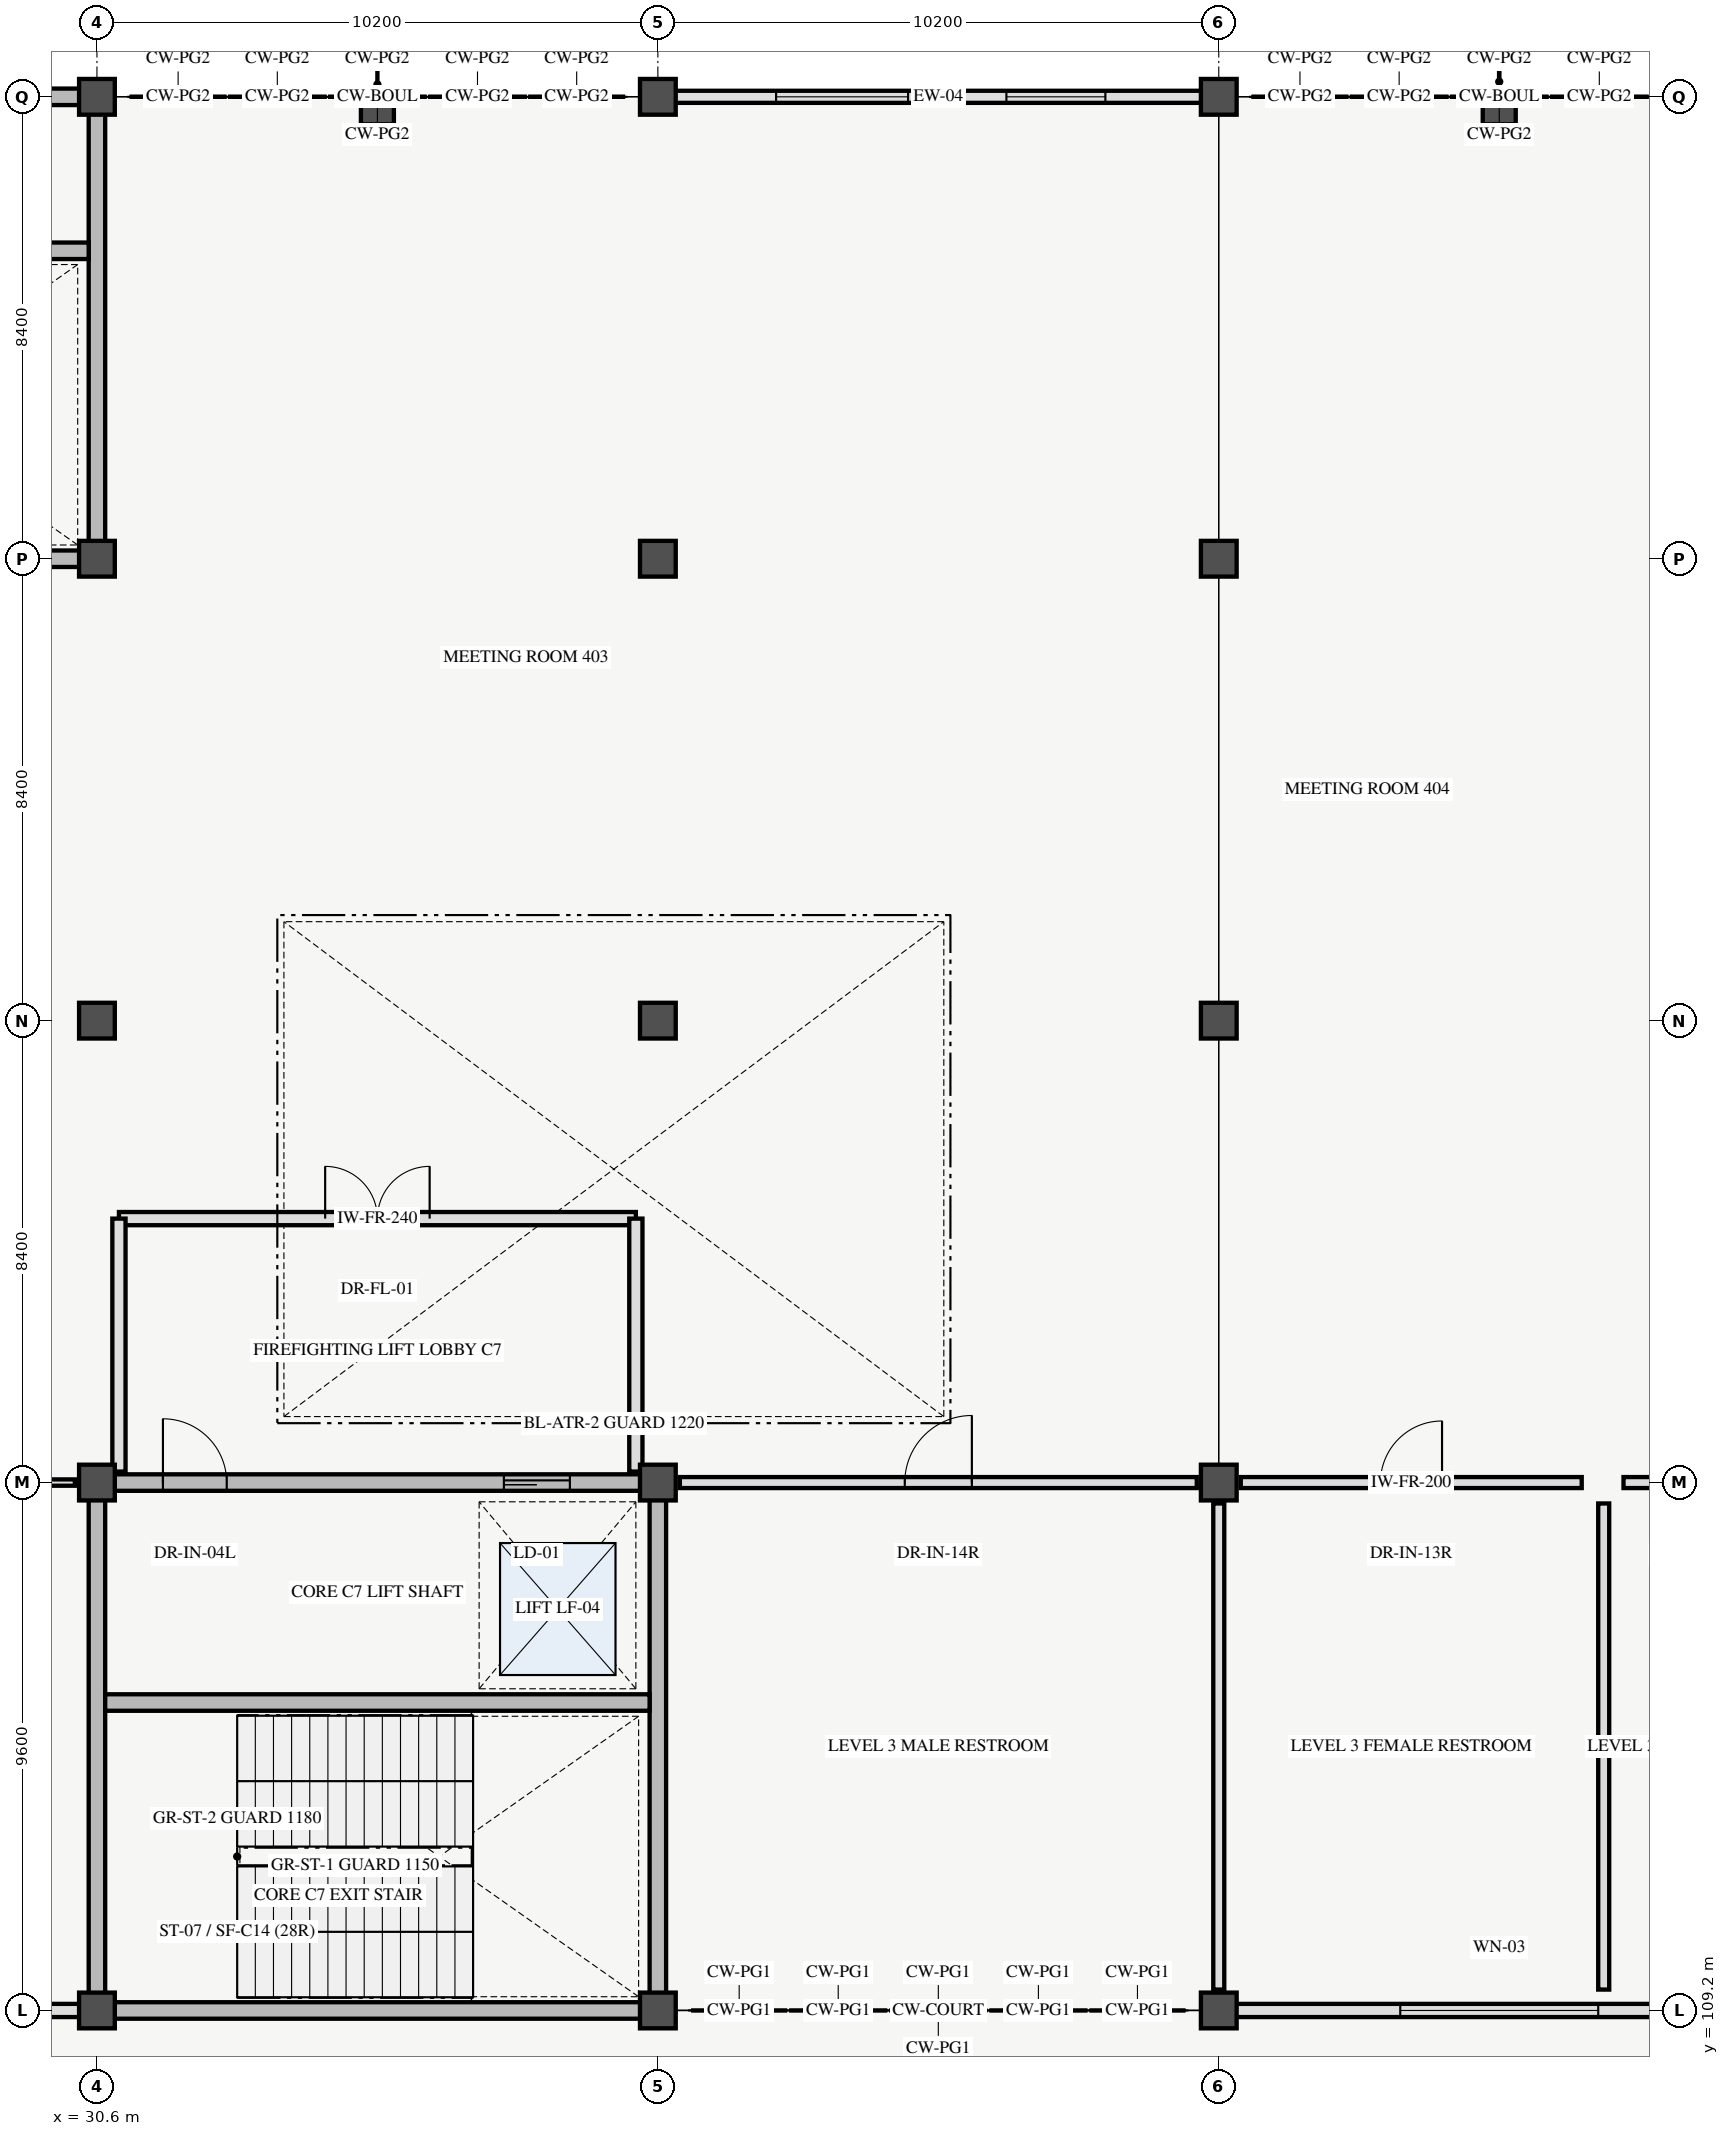
"""IFC4 building model, lengths in metres.
Left out: names, types, materials, properties, quantities, classifications, styles, units other than length and angle.
Written with IfcOpenShell. Run it as: python <this file> out.ifc"""

import sys

from ifc_helpers import new_model, si_unit, direction, frame, frame_2d, origin, origin_2d, place, context, subcontext, project, spatial, rectangle, extrude, element, fill, save


model = new_model("IFC4")
c1 = context("Model", 3, precision=1e-05, world=origin(), true_north=direction((0.0, 1.0)))
c2 = subcontext(c1, "Body", "Model", "MODEL_VIEW")
j1 = project(units=[si_unit("LENGTHUNIT", "METRE"), si_unit("PLANEANGLEUNIT", "RADIAN")], contexts=[c1])
p1 = place(None, origin())
s1 = spatial("IfcSite", under=j1, at=p1, CompositionType="ELEMENT")
p2 = place(p1, origin())
s2 = spatial("IfcBuilding", under=s1, at=p2, CompositionType="ELEMENT")
p3 = place(p2, frame((0.0, 0.0, 15.0)))
s3 = spatial("IfcBuildingStorey", under=s2, at=p3, CompositionType="ELEMENT", Elevation=15.0)
for number, where, z_axis, x_axis in (
    (1, (30.6, 109.2, 0.0), (0.0, 0.0, 1.0), (1.0, 0.0, 0.0)),
    (2, (30.6, 118.8, 0.0), (0.0, 0.0, 1.0), (1.0, 0.0, 0.0)),
    (3, (30.6, 127.2, 0.0), (0.0, 0.0, 1.0), (1.0, 0.0, 0.0)),
    (4, (30.6, 135.6, 0.0), (0.0, 0.0, 1.0), (1.0, 0.0, 0.0)),
    (5, (30.6, 144.0, 0.0), (0.0, 0.0, 1.0), (1.0, 0.0, 0.0)),
    (6, (40.8, 109.2, 0.0), (0.0, 0.0, 1.0), (1.0, 0.0, 0.0)),
    (7, (40.8, 118.8, 0.0), (0.0, 0.0, 1.0), (1.0, 0.0, 0.0)),
    (8, (40.8, 127.2, 0.0), (0.0, 0.0, 1.0), (1.0, 0.0, 0.0)),
    (9, (40.8, 135.6, 0.0), (0.0, 0.0, 1.0), (1.0, 0.0, 0.0)),
    (10, (40.8, 144.0, 0.0), (0.0, 0.0, 1.0), (1.0, 0.0, 0.0)),
    (11, (51.0, 109.2, 0.0), (0.0, 0.0, 1.0), (1.0, 0.0, 0.0)),
    (12, (51.0, 118.8, 0.0), (0.0, 0.0, 1.0), (1.0, 0.0, 0.0)),
    (13, (51.0, 127.2, 0.0), (0.0, 0.0, 1.0), (1.0, 0.0, 0.0)),
    (14, (51.0, 135.6, 0.0), (0.0, 0.0, 1.0), (1.0, 0.0, 0.0)),
    (15, (51.0, 144.0, 0.0), (0.0, 0.0, 1.0), (1.0, 0.0, 0.0)),
):
    element("IfcColumn", number, at=place(p3, frame(where, z_axis=z_axis, x_axis=x_axis)), inside=s3, PredefinedType="COLUMN", context=c2, shape_type="SweptSolid", body=[
        extrude(rectangle(XDim=0.65, YDim=0.65, at=origin_2d()), origin(), (0.0, 0.0, 1.0), 4.2),
    ])
for number, where, z_axis, x_axis in (
    (16, (35.7, 143.7, 0.0), (0.0, 0.0, 1.0), (1.0, 0.0, 0.0)),
    (17, (56.1, 143.7, 0.0), (0.0, 0.0, 1.0), (1.0, 0.0, 0.0)),
):
    element("IfcColumn", number, at=place(p3, frame(where, z_axis=z_axis, x_axis=x_axis)), inside=s3, PredefinedType="PILASTER", context=c2, shape_type="SweptSolid", body=[
        extrude(rectangle(XDim=0.6, YDim=0.4, at=origin_2d()), origin(), (0.0, 0.0, 1.0), 4.2),
    ])
p4 = place(p3, frame((30.6, 109.2, 0.0), z_axis=(0.0, 0.0, 1.0), x_axis=(1.0, 0.0, 0.0)))
e18 = element("IfcWall", 18, at=p4, inside=s3, PredefinedType="SHEAR", context=c2, shape_type="SweptSolid", body=[
    extrude(rectangle(XDim=10.2, YDim=0.3, at=frame_2d((5.1, 0.0))), origin(), (0.0, 0.0, 1.0), 4.2),
])
p5 = place(p3, frame((30.6, 118.8, 0.0), z_axis=(0.0, 0.0, 1.0), x_axis=(1.0, 0.0, 0.0)))
e19 = element("IfcWall", 19, at=p5, inside=s3, PredefinedType="SHEAR", context=c2, shape_type="SweptSolid", body=[
    extrude(rectangle(XDim=10.2, YDim=0.3, at=frame_2d((5.1, 0.0))), origin(), (0.0, 0.0, 1.0), 4.2),
])
p6 = place(p5, frame((1.2, 0.0, 0.0)))
e20 = element("IfcOpeningElement", 20, at=p6, cuts=e19, PredefinedType="OPENING", context=c2, shape_type="SweptSolid", body=[
    extrude(rectangle(XDim=1.16, YDim=2.2, at=frame_2d((0.58, 1.1))), frame((0.0, 0.16, 0.0), z_axis=(0.0, -1.0, 0.0), x_axis=(1.0, 0.0, 0.0)), (0.0, 0.0, 1.0), 0.32),
])
p7 = place(p5, frame((7.4, 0.0, 0.0)))
e21 = element("IfcOpeningElement", 21, at=p7, cuts=e19, PredefinedType="OPENING", context=c2, shape_type="SweptSolid", body=[
    extrude(rectangle(XDim=1.2, YDim=2.25, at=frame_2d((0.6, 1.125))), frame((0.0, 0.16, 0.0), z_axis=(0.0, -1.0, 0.0), x_axis=(1.0, 0.0, 0.0)), (0.0, 0.0, 1.0), 0.32),
])
for number, where, z_axis, x_axis in (
    (22, (30.6, 109.2, 0.0), (0.0, 0.0, 1.0), (0.0, 1.0, 0.0)),
    (23, (40.8, 109.2, 0.0), (0.0, 0.0, 1.0), (0.0, 1.0, 0.0)),
):
    element("IfcWall", number, at=place(p3, frame(where, z_axis=z_axis, x_axis=x_axis)), inside=s3, PredefinedType="SHEAR", context=c2, shape_type="SweptSolid", body=[
        extrude(rectangle(XDim=9.6, YDim=0.3, at=frame_2d((4.8, 0.0))), origin(), (0.0, 0.0, 1.0), 4.2),
    ])
p8 = place(p3, frame((20.64, 109.2, 0.0), z_axis=(0.0, 0.0, 1.0), x_axis=(1.0, 0.0, 0.0)))
e24 = element("IfcWall", 24, at=p8, inside=s3, PredefinedType="STANDARD", context=c2, shape_type="SweptSolid", body=[
    extrude(rectangle(XDim=9.72, YDim=0.24, at=frame_2d((4.86, 0.0))), origin(), (0.0, 0.0, 1.0), 3.06),
])
p9 = place(p8, frame((3.81, 0.0, 0.0)))
e25 = element("IfcOpeningElement", 25, at=p9, cuts=e24, PredefinedType="OPENING", context=c2, shape_type="SweptSolid", body=[
    extrude(rectangle(XDim=2.1, YDim=2.3, at=frame_2d((1.05, 1.15))), frame((0.0, 0.13, 0.0), z_axis=(0.0, -1.0, 0.0), x_axis=(1.0, 0.0, 0.0)), (0.0, 0.0, 1.0), 0.26),
])
p10 = place(p3, frame((41.04, 144.0, 0.0), z_axis=(0.0, 0.0, 1.0), x_axis=(1.0, 0.0, 0.0)))
e26 = element("IfcWall", 26, at=p10, inside=s3, PredefinedType="STANDARD", context=c2, shape_type="SweptSolid", body=[
    extrude(rectangle(XDim=9.72, YDim=0.22, at=frame_2d((4.86, 0.0))), origin(), (0.0, 0.0, 1.0), 3.06),
])
p11 = place(p10, frame((1.91, 0.0, 0.7)))
e27 = element("IfcOpeningElement", 27, at=p11, cuts=e26, PredefinedType="OPENING", context=c2, shape_type="SweptSolid", body=[
    extrude(rectangle(XDim=2.4, YDim=2.1, at=frame_2d((1.2, 1.05))), frame((0.0, 0.12, 0.0), z_axis=(0.0, -1.0, 0.0), x_axis=(1.0, 0.0, 0.0)), (0.0, 0.0, 1.0), 0.24),
])
p12 = place(p10, frame((6.098, 0.0, 0.85)))
e28 = element("IfcOpeningElement", 28, at=p12, cuts=e26, PredefinedType="OPENING", context=c2, shape_type="SweptSolid", body=[
    extrude(rectangle(XDim=1.8, YDim=1.8, at=frame_2d((0.9, 0.9))), frame((0.0, 0.12, 0.0), z_axis=(0.0, -1.0, 0.0), x_axis=(1.0, 0.0, 0.0)), (0.0, 0.0, 1.0), 0.24),
])
p13 = place(p3, frame((51.24, 109.2, 0.0), z_axis=(0.0, 0.0, 1.0), x_axis=(1.0, 0.0, 0.0)))
e29 = element("IfcWall", 29, at=p13, inside=s3, PredefinedType="STANDARD", context=c2, shape_type="SweptSolid", body=[
    extrude(rectangle(XDim=9.72, YDim=0.24, at=frame_2d((4.86, 0.0))), origin(), (0.0, 0.0, 1.0), 3.06),
])
p14 = place(p13, frame((3.06, 0.0, 0.9)))
e30 = element("IfcOpeningElement", 30, at=p14, cuts=e29, PredefinedType="OPENING", context=c2, shape_type="SweptSolid", body=[
    extrude(rectangle(XDim=3.6, YDim=2.1, at=frame_2d((1.8, 1.05))), frame((0.0, 0.13, 0.0), z_axis=(0.0, -1.0, 0.0), x_axis=(1.0, 0.0, 0.0)), (0.0, 0.0, 1.0), 0.26),
])
p15 = place(p3, frame((30.75, 114.8, 0.0), z_axis=(0.0, 0.0, 1.0), x_axis=(1.0, 0.0, 0.0)))
e31 = element("IfcWall", 31, at=p15, inside=s3, PredefinedType="SHEAR", context=c2, shape_type="SweptSolid", body=[
    extrude(rectangle(XDim=9.9, YDim=0.3, at=frame_2d((4.95, 0.0))), origin(), (0.0, 0.0, 1.0), 4.2),
])
p16 = place(p3, frame((20.4, 135.6, 0.0), z_axis=(0.0, 0.0, 1.0), x_axis=(1.0, 0.0, 0.0)))
e32 = element("IfcWall", 32, at=p16, inside=s3, PredefinedType="SHEAR", context=c2, shape_type="SweptSolid", body=[
    extrude(rectangle(XDim=10.2, YDim=0.3, at=frame_2d((5.1, 0.0))), origin(), (0.0, 0.0, 1.0), 4.2),
])
p17 = place(p16, frame((0.92, 0.0, 0.0)))
e33 = element("IfcOpeningElement", 33, at=p17, cuts=e32, PredefinedType="OPENING", context=c2, shape_type="SweptSolid", body=[
    extrude(rectangle(XDim=1.16, YDim=2.2, at=frame_2d((0.58, 1.1))), frame((0.0, 0.16, 0.0), z_axis=(0.0, -1.0, 0.0), x_axis=(1.0, 0.0, 0.0)), (0.0, 0.0, 1.0), 0.32),
])
p18 = place(p3, frame((20.4, 144.0, 0.0), z_axis=(0.0, 0.0, 1.0), x_axis=(1.0, 0.0, 0.0)))
e34 = element("IfcWall", 34, at=p18, inside=s3, PredefinedType="SHEAR", context=c2, shape_type="SweptSolid", body=[
    extrude(rectangle(XDim=10.2, YDim=0.3, at=frame_2d((5.1, 0.0))), origin(), (0.0, 0.0, 1.0), 4.2),
])
p19 = place(p3, frame((30.6, 135.6, 0.0), z_axis=(0.0, 0.0, 1.0), x_axis=(0.0, 1.0, 0.0)))
e35 = element("IfcWall", 35, at=p19, inside=s3, PredefinedType="SHEAR", context=c2, shape_type="SweptSolid", body=[
    extrude(rectangle(XDim=8.4, YDim=0.3, at=frame_2d((4.2, 0.0))), origin(), (0.0, 0.0, 1.0), 4.2),
])
p20 = place(p3, frame((20.55, 141.2, 0.0), z_axis=(0.0, 0.0, 1.0), x_axis=(1.0, 0.0, 0.0)))
e36 = element("IfcWall", 36, at=p20, inside=s3, PredefinedType="SHEAR", context=c2, shape_type="SweptSolid", body=[
    extrude(rectangle(XDim=9.9, YDim=0.3, at=frame_2d((4.95, 0.0))), origin(), (0.0, 0.0, 1.0), 4.2),
])
p21 = place(p3, frame((31.0, 123.6, 0.0), z_axis=(0.0, 0.0, 1.0), x_axis=(1.0, 0.0, 0.0)))
e37 = element("IfcWall", 37, at=p21, inside=s3, PredefinedType="PARTITIONING", context=c2, shape_type="SweptSolid", body=[
    extrude(rectangle(XDim=9.4, YDim=0.24, at=frame_2d((4.7, 0.0))), origin(), (0.0, 0.0, 1.0), 3.06),
])
p22 = place(p21, frame((3.75, 0.0, 0.0)))
e38 = element("IfcOpeningElement", 38, at=p22, cuts=e37, PredefinedType="OPENING", context=c2, shape_type="SweptSolid", body=[
    extrude(rectangle(XDim=1.9, YDim=2.25, at=frame_2d((0.95, 1.125))), frame((0.0, 0.13, 0.0), z_axis=(0.0, -1.0, 0.0), x_axis=(1.0, 0.0, 0.0)), (0.0, 0.0, 1.0), 0.26),
])
for number, where, z_axis, x_axis in (
    (39, (40.4, 119.0, 0.0), (0.0, 0.0, 1.0), (0.0, 1.0, 0.0)),
    (40, (31.0, 119.0, 0.0), (0.0, 0.0, 1.0), (0.0, 1.0, 0.0)),
):
    element("IfcWall", number, at=place(p3, frame(where, z_axis=z_axis, x_axis=x_axis)), inside=s3, PredefinedType="PARTITIONING", context=c2, shape_type="SweptSolid", body=[
        extrude(rectangle(XDim=4.6, YDim=0.24, at=frame_2d((2.3, 0.0))), origin(), (0.0, 0.0, 1.0), 3.06),
    ])
p23 = place(p3, frame((20.8, 118.8, 0.0), z_axis=(0.0, 0.0, 1.0), x_axis=(1.0, 0.0, 0.0)))
e41 = element("IfcWall", 41, at=p23, inside=s3, PredefinedType="PARTITIONING", context=c2, shape_type="SweptSolid", body=[
    extrude(rectangle(XDim=9.4, YDim=0.115, at=frame_2d((4.7, 0.0))), origin(), (0.0, 0.0, 1.0), 3.06),
])
p24 = place(p23, frame((4.16, 0.0, 0.0)))
e42 = element("IfcOpeningElement", 42, at=p24, cuts=e41, PredefinedType="OPENING", context=c2, shape_type="SweptSolid", body=[
    extrude(rectangle(XDim=1.08, YDim=2.18, at=frame_2d((0.54, 1.09))), frame((0.0, 0.067, 0.0), z_axis=(0.0, -1.0, 0.0), x_axis=(1.0, 0.0, 0.0)), (0.0, 0.0, 1.0), 0.135),
])
p25 = place(p3, frame((51.4, 118.8, 0.0), z_axis=(0.0, 0.0, 1.0), x_axis=(1.0, 0.0, 0.0)))
e43 = element("IfcWall", 43, at=p25, inside=s3, PredefinedType="PARTITIONING", context=c2, shape_type="SweptSolid", body=[
    extrude(rectangle(XDim=6.2, YDim=0.2, at=frame_2d((3.1, 0.0))), origin(), (0.0, 0.0, 1.0), 3.06),
])
p26 = place(p25, frame((2.54, 0.0, 0.0)))
e44 = element("IfcOpeningElement", 44, at=p26, cuts=e43, PredefinedType="OPENING", context=c2, shape_type="SweptSolid", body=[
    extrude(rectangle(XDim=1.12, YDim=2.18, at=frame_2d((0.56, 1.09))), frame((0.0, 0.11, 0.0), z_axis=(0.0, -1.0, 0.0), x_axis=(1.0, 0.0, 0.0)), (0.0, 0.0, 1.0), 0.22),
])
p27 = place(p3, frame((41.2, 118.8, 0.0), z_axis=(0.0, 0.0, 1.0), x_axis=(1.0, 0.0, 0.0)))
e45 = element("IfcWall", 45, at=p27, inside=s3, PredefinedType="PARTITIONING", context=c2, shape_type="SweptSolid", body=[
    extrude(rectangle(XDim=9.4, YDim=0.2, at=frame_2d((4.7, 0.0))), origin(), (0.0, 0.0, 1.0), 3.06),
])
p28 = place(p27, frame((4.09, 0.0, 0.0)))
e46 = element("IfcOpeningElement", 46, at=p28, cuts=e45, PredefinedType="OPENING", context=c2, shape_type="SweptSolid", body=[
    extrude(rectangle(XDim=1.22, YDim=2.22, at=frame_2d((0.61, 1.11))), frame((0.0, 0.11, 0.0), z_axis=(0.0, -1.0, 0.0), x_axis=(1.0, 0.0, 0.0)), (0.0, 0.0, 1.0), 0.22),
])
p29 = place(p3, frame((58.36, 118.8, 0.0), z_axis=(0.0, 0.0, 1.0), x_axis=(1.0, 0.0, 0.0)))
e47 = element("IfcWall", 47, at=p29, inside=s3, PredefinedType="PARTITIONING", context=c2, shape_type="SweptSolid", body=[
    extrude(rectangle(XDim=2.48, YDim=0.2, at=frame_2d((1.24, 0.0))), origin(), (0.0, 0.0, 1.0), 3.06),
])
p30 = place(p29, frame((0.8, 0.0, 0.0)))
e48 = element("IfcOpeningElement", 48, at=p30, cuts=e47, PredefinedType="OPENING", context=c2, shape_type="SweptSolid", body=[
    extrude(rectangle(XDim=0.88, YDim=2.08, at=frame_2d((0.44, 1.04))), frame((0.0, 0.11, 0.0), z_axis=(0.0, -1.0, 0.0), x_axis=(1.0, 0.0, 0.0)), (0.0, 0.0, 1.0), 0.22),
])
for number, where, z_axis, x_axis in (
    (49, (51.0, 109.58, 0.0), (0.0, 0.0, 1.0), (0.0, 1.0, 0.0)),
    (50, (58.0, 109.58, 0.0), (0.0, 0.0, 1.0), (0.0, 1.0, 0.0)),
):
    element("IfcWall", number, at=place(p3, frame(where, z_axis=z_axis, x_axis=x_axis)), inside=s3, PredefinedType="PARTITIONING", context=c2, shape_type="SweptSolid", body=[
        extrude(rectangle(XDim=8.84, YDim=0.2, at=frame_2d((4.42, 0.0))), origin(), (0.0, 0.0, 1.0), 3.06),
    ])
p31 = place(p11, origin())
e51 = element("IfcWindow", 51, at=p31, inside=s3, PartitioningType="DOUBLE_PANEL_VERTICAL", PredefinedType="WINDOW", context=c2, shape_type="SweptSolid", body=[
    extrude(rectangle(XDim=2.4, YDim=2.1, at=frame_2d((1.2, 1.05))), frame((0.0, 0.03, 0.0), z_axis=(0.0, -1.0, 0.0), x_axis=(1.0, 0.0, 0.0)), (0.0, 0.0, 1.0), 0.06),
])
fill(e27, e51)
p32 = place(p12, origin())
e52 = element("IfcWindow", 52, at=p32, inside=s3, PartitioningType="DOUBLE_PANEL_VERTICAL", PredefinedType="WINDOW", context=c2, shape_type="SweptSolid", body=[
    extrude(rectangle(XDim=1.8, YDim=1.8, at=frame_2d((0.9, 0.9))), frame((0.0, 0.03, 0.0), z_axis=(0.0, -1.0, 0.0), x_axis=(1.0, 0.0, 0.0)), (0.0, 0.0, 1.0), 0.06),
])
fill(e28, e52)
p33 = place(p14, origin())
e53 = element("IfcWindow", 53, at=p33, inside=s3, PartitioningType="TRIPLE_PANEL_VERTICAL", PredefinedType="WINDOW", context=c2, shape_type="SweptSolid", body=[
    extrude(rectangle(XDim=3.6, YDim=2.1, at=frame_2d((1.8, 1.05))), frame((0.0, 0.03, 0.0), z_axis=(0.0, -1.0, 0.0), x_axis=(1.0, 0.0, 0.0)), (0.0, 0.0, 1.0), 0.06),
])
fill(e30, e53)
p34 = place(p6, origin())
e54 = element("IfcDoor", 54, at=p34, inside=s3, OperationType="SINGLE_SWING_LEFT", PredefinedType="DOOR", context=c2, shape_type="SweptSolid", body=[
    extrude(rectangle(XDim=1.16, YDim=2.2, at=frame_2d((0.58, 1.1))), frame((0.0, 0.025, 0.0), z_axis=(0.0, -1.0, 0.0), x_axis=(1.0, 0.0, 0.0)), (0.0, 0.0, 1.0), 0.05),
])
fill(e20, e54)
p35 = place(p7, origin())
e55 = element("IfcDoor", 55, at=p35, inside=s3, OperationType="SLIDING_TO_LEFT", PredefinedType="DOOR", context=c2, shape_type="SweptSolid", body=[
    extrude(rectangle(XDim=1.2, YDim=2.25, at=frame_2d((0.6, 1.125))), frame((0.0, 0.025, 0.0), z_axis=(0.0, -1.0, 0.0), x_axis=(1.0, 0.0, 0.0)), (0.0, 0.0, 1.0), 0.05),
])
fill(e21, e55)
p36 = place(p22, origin())
e56 = element("IfcDoor", 56, at=p36, inside=s3, OperationType="DOUBLE_DOOR_SINGLE_SWING", PredefinedType="DOOR", context=c2, shape_type="SweptSolid", body=[
    extrude(rectangle(XDim=1.9, YDim=2.25, at=frame_2d((0.95, 1.125))), frame((0.0, 0.025, 0.0), z_axis=(0.0, -1.0, 0.0), x_axis=(1.0, 0.0, 0.0)), (0.0, 0.0, 1.0), 0.05),
])
fill(e38, e56)
p37 = place(p26, origin())
e57 = element("IfcDoor", 57, at=p37, inside=s3, OperationType="SINGLE_SWING_RIGHT", PredefinedType="DOOR", context=c2, shape_type="SweptSolid", body=[
    extrude(rectangle(XDim=1.12, YDim=2.18, at=frame_2d((0.56, 1.09))), frame((0.0, 0.025, 0.0), z_axis=(0.0, -1.0, 0.0), x_axis=(1.0, 0.0, 0.0)), (0.0, 0.0, 1.0), 0.05),
])
fill(e44, e57)
p38 = place(p28, origin())
e58 = element("IfcDoor", 58, at=p38, inside=s3, OperationType="SINGLE_SWING_RIGHT", PredefinedType="DOOR", context=c2, shape_type="SweptSolid", body=[
    extrude(rectangle(XDim=1.22, YDim=2.22, at=frame_2d((0.61, 1.11))), frame((0.0, 0.025, 0.0), z_axis=(0.0, -1.0, 0.0), x_axis=(1.0, 0.0, 0.0)), (0.0, 0.0, 1.0), 0.05),
])
fill(e46, e58)
save(model, sys.argv[1])
